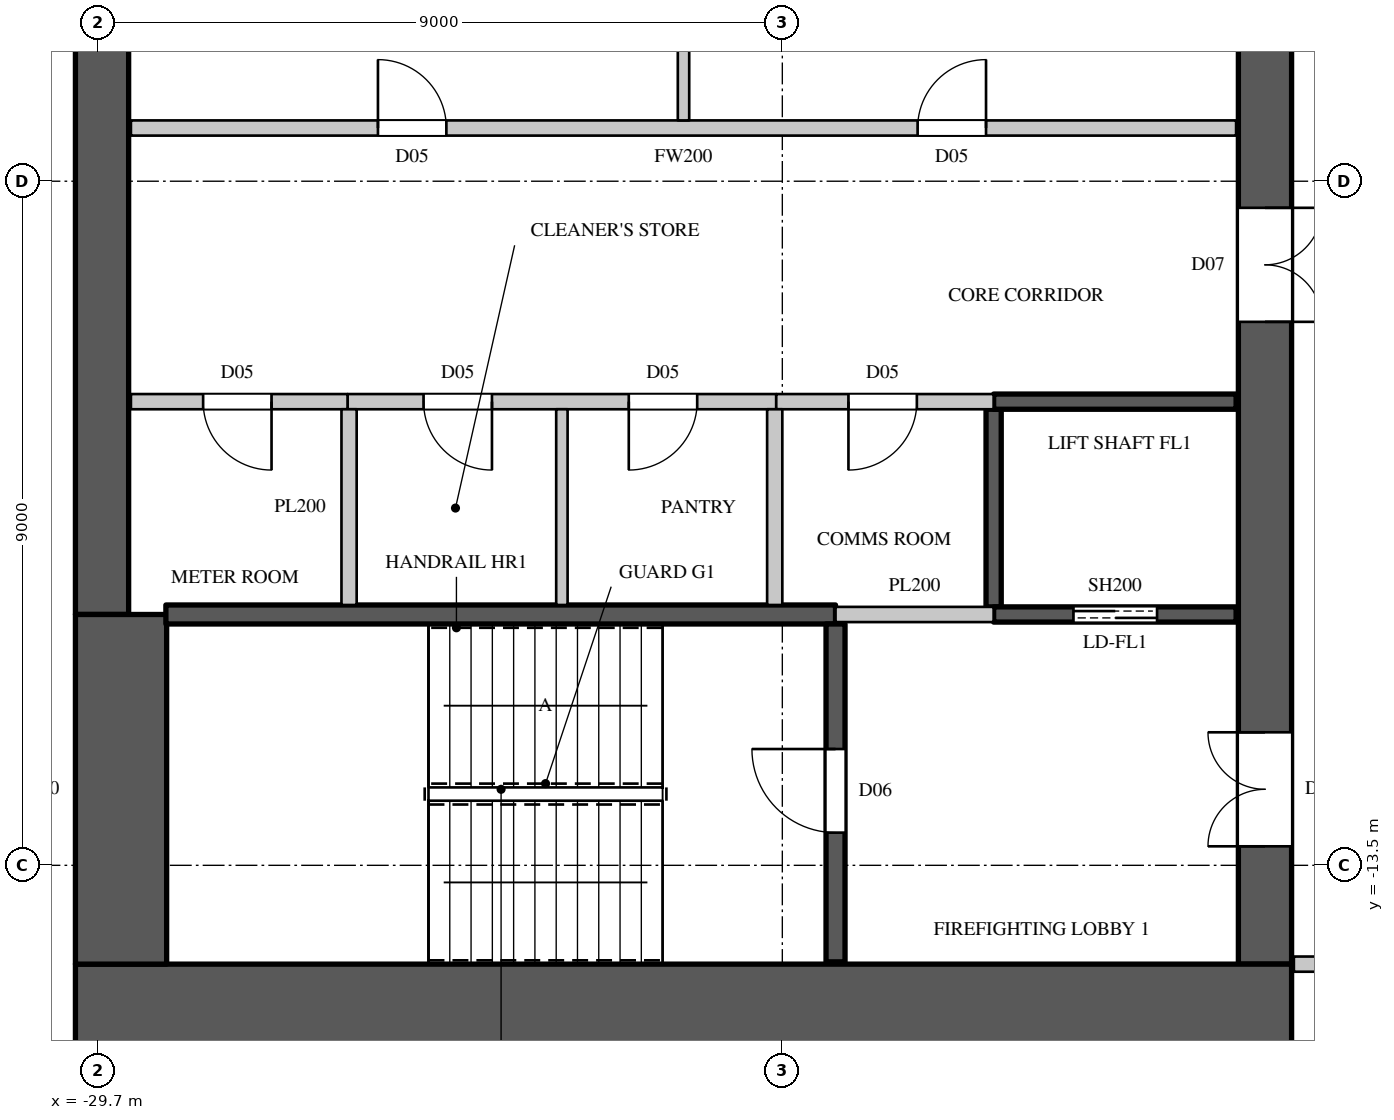
"""IFC4 building model, lengths in metres.
Left out: names, types, materials, properties, quantities, classifications, styles, units other than length and angle.
Written with IfcOpenShell. Run it as: python <this file> out.ifc"""

import sys

from ifc_helpers import new_model, si_unit, direction, frame, frame_2d, origin, place, context, subcontext, project, spatial, rectangle, extrude, element, fill, save


model = new_model("IFC4")
c1 = context("Model", 3, precision=1e-05, world=origin(), true_north=direction((0.0, 1.0)))
c2 = subcontext(c1, "Body", "Model", "MODEL_VIEW")
j1 = project(units=[si_unit("LENGTHUNIT", "METRE"), si_unit("PLANEANGLEUNIT", "RADIAN")], contexts=[c1])
p1 = place(None, origin())
s1 = spatial("IfcSite", under=j1, at=p1, CompositionType="ELEMENT")
p2 = place(p1, origin())
s2 = spatial("IfcBuilding", under=s1, at=p2, CompositionType="ELEMENT")
p3 = place(p2, frame((0.0, 0.0, 296.7)))
s3 = spatial("IfcBuildingStorey", under=s2, at=p3, CompositionType="ELEMENT", Elevation=296.7)
p4 = place(p3, frame((-30.0, -15.4, 0.0), z_axis=(0.0, 0.0, 1.0), x_axis=(1.0, 0.0, 0.0)))
e1 = element("IfcWall", 1, at=p4, inside=s3, PredefinedType="SHEAR", context=c2, shape_type="SweptSolid", body=[
    extrude(rectangle(XDim=16.0, YDim=1.2, at=frame_2d((8.0, 0.0))), origin(), (0.0, 0.0, 1.0), 4.1),
])
p5 = place(p3, frame((-14.35, -14.8, 0.0), z_axis=(0.0, 0.0, 1.0), x_axis=(0.0, 1.0, 0.0)))
e2 = element("IfcWall", 2, at=p5, inside=s3, PredefinedType="SHEAR", context=c2, shape_type="SweptSolid", body=[
    extrude(rectangle(XDim=29.6, YDim=0.7, at=frame_2d((14.8, 0.0))), origin(), (0.0, 0.0, 1.0), 4.1),
])
p6 = place(p5, frame((1.55, 0.0, 0.0)))
e3 = element("IfcOpeningElement", 3, at=p6, cuts=e2, PredefinedType="OPENING", context=c2, shape_type="SweptSolid", body=[
    extrude(rectangle(XDim=1.5, YDim=2.4, at=frame_2d((0.75, 1.2))), frame((0.0, 0.36, 0.0), z_axis=(0.0, -1.0, 0.0), x_axis=(1.0, 0.0, 0.0)), (0.0, 0.0, 1.0), 0.72),
])
p7 = place(p5, frame((26.55, 0.0, 0.0)))
e4 = element("IfcOpeningElement", 4, at=p7, cuts=e2, PredefinedType="OPENING", context=c2, shape_type="SweptSolid", body=[
    extrude(rectangle(XDim=1.5, YDim=2.4, at=frame_2d((0.75, 1.2))), frame((0.0, 0.36, 0.0), z_axis=(0.0, -1.0, 0.0), x_axis=(1.0, 0.0, 0.0)), (0.0, 0.0, 1.0), 0.72),
])
p8 = place(p5, frame((8.45, 0.0, 0.0)))
e5 = element("IfcOpeningElement", 5, at=p8, cuts=e2, PredefinedType="OPENING", context=c2, shape_type="SweptSolid", body=[
    extrude(rectangle(XDim=1.5, YDim=2.4, at=frame_2d((0.75, 1.2))), frame((0.0, 0.36, 0.0), z_axis=(0.0, -1.0, 0.0), x_axis=(1.0, 0.0, 0.0)), (0.0, 0.0, 1.0), 0.72),
])
p9 = place(p5, frame((19.65, 0.0, 0.0)))
e6 = element("IfcOpeningElement", 6, at=p9, cuts=e2, PredefinedType="OPENING", context=c2, shape_type="SweptSolid", body=[
    extrude(rectangle(XDim=1.5, YDim=2.4, at=frame_2d((0.75, 1.2))), frame((0.0, 0.36, 0.0), z_axis=(0.0, -1.0, 0.0), x_axis=(1.0, 0.0, 0.0)), (0.0, 0.0, 1.0), 0.72),
])
p10 = place(p5, frame((14.5, 0.0, 0.0)))
e7 = element("IfcOpeningElement", 7, at=p10, cuts=e2, PredefinedType="OPENING", context=c2, shape_type="SweptSolid", body=[
    extrude(rectangle(XDim=0.6, YDim=2.0, at=frame_2d((0.3, 1.0))), frame((0.0, 0.36, 0.0), z_axis=(0.0, -1.0, 0.0), x_axis=(1.0, 0.0, 0.0)), (0.0, 0.0, 1.0), 0.72),
])
p11 = place(p3, frame((-29.65, -10.2, 0.0), z_axis=(0.0, 0.0, 1.0), x_axis=(0.0, 1.0, 0.0)))
e8 = element("IfcWall", 8, at=p11, inside=s3, PredefinedType="SHEAR", context=c2, shape_type="SweptSolid", body=[
    extrude(rectangle(XDim=20.4, YDim=0.7, at=frame_2d((10.2, 0.0))), origin(), (0.0, 0.0, 1.0), 4.1),
])
p12 = place(p3, frame((-29.4, -14.8, 0.0), z_axis=(0.0, 0.0, 1.0), x_axis=(0.0, 1.0, 0.0)))
e9 = element("IfcWall", 9, at=p12, inside=s3, PredefinedType="SHEAR", context=c2, shape_type="SweptSolid", body=[
    extrude(rectangle(XDim=4.6, YDim=1.2, at=frame_2d((2.3, 0.0))), origin(), (0.0, 0.0, 1.0), 4.1),
])
p13 = place(p3, frame((-29.27, -3.8, 0.0), z_axis=(0.0, 0.0, 1.0), x_axis=(1.0, 0.0, 0.0)))
e10 = element("IfcWall", 10, at=p13, inside=s3, PredefinedType="PARTITIONING", context=c2, shape_type="SweptSolid", body=[
    extrude(rectangle(XDim=14.54, YDim=0.2, at=frame_2d((7.27, 0.0))), origin(), (0.0, 0.0, 1.0), 3.8),
])
p14 = place(p13, frame((3.25, 0.0, 0.0)))
e11 = element("IfcOpeningElement", 11, at=p14, cuts=e10, PredefinedType="OPENING", context=c2, shape_type="SweptSolid", body=[
    extrude(rectangle(XDim=0.9, YDim=2.2, at=frame_2d((0.45, 1.1))), frame((0.0, 0.11, 0.0), z_axis=(0.0, -1.0, 0.0), x_axis=(1.0, 0.0, 0.0)), (0.0, 0.0, 1.0), 0.22),
])
p15 = place(p13, frame((10.35, 0.0, 0.0)))
e12 = element("IfcOpeningElement", 12, at=p15, cuts=e10, PredefinedType="OPENING", context=c2, shape_type="SweptSolid", body=[
    extrude(rectangle(XDim=0.9, YDim=2.2, at=frame_2d((0.45, 1.1))), frame((0.0, 0.11, 0.0), z_axis=(0.0, -1.0, 0.0), x_axis=(1.0, 0.0, 0.0)), (0.0, 0.0, 1.0), 0.22),
])
p16 = place(p3, frame((-26.42, -7.4, 0.0), z_axis=(0.0, 0.0, 1.0), x_axis=(1.0, 0.0, 0.0)))
e13 = element("IfcWall", 13, at=p16, inside=s3, PredefinedType="PARTITIONING", context=c2, shape_type="SweptSolid", body=[
    extrude(rectangle(XDim=5.64, YDim=0.2, at=frame_2d((2.82, 0.0))), origin(), (0.0, 0.0, 1.0), 3.8),
])
p17 = place(p16, frame((1.0, 0.0, 0.0)))
e14 = element("IfcOpeningElement", 14, at=p17, cuts=e13, PredefinedType="OPENING", context=c2, shape_type="SweptSolid", body=[
    extrude(rectangle(XDim=0.9, YDim=2.2, at=frame_2d((0.45, 1.1))), frame((0.0, 0.11, 0.0), z_axis=(0.0, -1.0, 0.0), x_axis=(1.0, 0.0, 0.0)), (0.0, 0.0, 1.0), 0.22),
])
p18 = place(p16, frame((3.7, 0.0, 0.0)))
e15 = element("IfcOpeningElement", 15, at=p18, cuts=e13, PredefinedType="OPENING", context=c2, shape_type="SweptSolid", body=[
    extrude(rectangle(XDim=0.9, YDim=2.2, at=frame_2d((0.45, 1.1))), frame((0.0, 0.11, 0.0), z_axis=(0.0, -1.0, 0.0), x_axis=(1.0, 0.0, 0.0)), (0.0, 0.0, 1.0), 0.22),
])
p19 = place(p3, frame((-13.97, -14.8, 0.0), z_axis=(0.0, 0.0, 1.0), x_axis=(1.0, 0.0, 0.0)))
e16 = element("IfcWall", 16, at=p19, inside=s3, PredefinedType="PARTITIONING", context=c2, shape_type="SweptSolid", body=[
    extrude(rectangle(XDim=2.87, YDim=0.2, at=frame_2d((1.435, 0.0))), origin(), (0.0, 0.0, 1.0), 3.8),
])
p20 = place(p3, frame((-23.6, -10.075, 0.0), z_axis=(0.0, 0.0, 1.0), x_axis=(0.0, 1.0, 0.0)))
e17 = element("IfcWall", 17, at=p20, inside=s3, PredefinedType="PARTITIONING", context=c2, shape_type="SweptSolid", body=[
    extrude(rectangle(XDim=2.575, YDim=0.15, at=frame_2d((1.288, 0.0))), origin(), (0.0, 0.0, 1.0), 3.8),
])
p21 = place(p3, frame((-22.0, -3.7, 0.0), z_axis=(0.0, 0.0, 1.0), x_axis=(0.0, 1.0, 0.0)))
e18 = element("IfcWall", 18, at=p21, inside=s3, PredefinedType="PARTITIONING", context=c2, shape_type="SweptSolid", body=[
    extrude(rectangle(XDim=2.6, YDim=0.15, at=frame_2d((1.3, 0.0))), origin(), (0.0, 0.0, 1.0), 3.8),
])
p22 = place(p3, frame((-29.27, -7.4, 0.0), z_axis=(0.0, 0.0, 1.0), x_axis=(1.0, 0.0, 0.0)))
e19 = element("IfcWall", 19, at=p22, inside=s3, PredefinedType="PARTITIONING", context=c2, shape_type="SweptSolid", body=[
    extrude(rectangle(XDim=2.85, YDim=0.2, at=frame_2d((1.425, 0.0))), origin(), (0.0, 0.0, 1.0), 3.8),
])
p23 = place(p22, frame((0.95, 0.0, 0.0)))
e20 = element("IfcOpeningElement", 20, at=p23, cuts=e19, PredefinedType="OPENING", context=c2, shape_type="SweptSolid", body=[
    extrude(rectangle(XDim=0.9, YDim=2.2, at=frame_2d((0.45, 1.1))), frame((0.0, 0.11, 0.0), z_axis=(0.0, -1.0, 0.0), x_axis=(1.0, 0.0, 0.0)), (0.0, 0.0, 1.0), 0.22),
])
p24 = place(p3, frame((-26.4, -10.075, 0.0), z_axis=(0.0, 0.0, 1.0), x_axis=(0.0, 1.0, 0.0)))
e21 = element("IfcWall", 21, at=p24, inside=s3, PredefinedType="PARTITIONING", context=c2, shape_type="SweptSolid", body=[
    extrude(rectangle(XDim=2.575, YDim=0.2, at=frame_2d((1.288, 0.0))), origin(), (0.0, 0.0, 1.0), 3.8),
])
p25 = place(p3, frame((-20.78, -7.4, 0.0), z_axis=(0.0, 0.0, 1.0), x_axis=(1.0, 0.0, 0.0)))
e22 = element("IfcWall", 22, at=p25, inside=s3, PredefinedType="PARTITIONING", context=c2, shape_type="SweptSolid", body=[
    extrude(rectangle(XDim=2.86, YDim=0.2, at=frame_2d((1.43, 0.0))), origin(), (0.0, 0.0, 1.0), 3.8),
])
p26 = place(p25, frame((0.95, 0.0, 0.0)))
e23 = element("IfcOpeningElement", 23, at=p26, cuts=e22, PredefinedType="OPENING", context=c2, shape_type="SweptSolid", body=[
    extrude(rectangle(XDim=0.9, YDim=2.2, at=frame_2d((0.45, 1.1))), frame((0.0, 0.11, 0.0), z_axis=(0.0, -1.0, 0.0), x_axis=(1.0, 0.0, 0.0)), (0.0, 0.0, 1.0), 0.22),
])
p27 = place(p3, frame((-20.8, -10.075, 0.0), z_axis=(0.0, 0.0, 1.0), x_axis=(0.0, 1.0, 0.0)))
e24 = element("IfcWall", 24, at=p27, inside=s3, PredefinedType="PARTITIONING", context=c2, shape_type="SweptSolid", body=[
    extrude(rectangle(XDim=2.575, YDim=0.2, at=frame_2d((1.288, 0.0))), origin(), (0.0, 0.0, 1.0), 3.8),
])
p28 = place(p3, frame((-20.0, -10.2, 0.0), z_axis=(0.0, 0.0, 1.0), x_axis=(1.0, 0.0, 0.0)))
e25 = element("IfcWall", 25, at=p28, inside=s3, PredefinedType="PARTITIONING", context=c2, shape_type="SweptSolid", body=[
    extrude(rectangle(XDim=2.08, YDim=0.2, at=frame_2d((1.04, 0.0))), origin(), (0.0, 0.0, 1.0), 3.8),
])
p29 = place(p3, frame((-17.92, -10.1, 0.0), z_axis=(0.0, 0.0, 1.0), x_axis=(0.0, 1.0, 0.0)))
e26 = element("IfcWall", 26, at=p29, inside=s3, PredefinedType="SHEAR", context=c2, shape_type="SweptSolid", body=[
    extrude(rectangle(XDim=2.6, YDim=0.2, at=frame_2d((1.3, 0.0))), origin(), (0.0, 0.0, 1.0), 3.8),
])
p30 = place(p3, frame((-17.92, -10.2, 0.0), z_axis=(0.0, 0.0, 1.0), x_axis=(1.0, 0.0, 0.0)))
e27 = element("IfcWall", 27, at=p30, inside=s3, PredefinedType="SHEAR", context=c2, shape_type="SweptSolid", body=[
    extrude(rectangle(XDim=3.19, YDim=0.2, at=frame_2d((1.595, 0.0))), origin(), (0.0, 0.0, 1.0), 3.8),
])
p31 = place(p30, frame((1.05, 0.0, 0.0)))
e28 = element("IfcOpeningElement", 28, at=p31, cuts=e27, PredefinedType="OPENING", context=c2, shape_type="SweptSolid", body=[
    extrude(rectangle(XDim=1.1, YDim=2.2, at=frame_2d((0.55, 1.1))), frame((0.0, 0.11, 0.0), z_axis=(0.0, -1.0, 0.0), x_axis=(1.0, 0.0, 0.0)), (0.0, 0.0, 1.0), 0.22),
])
p32 = place(p3, frame((-17.92, -7.4, 0.0), z_axis=(0.0, 0.0, 1.0), x_axis=(1.0, 0.0, 0.0)))
e29 = element("IfcWall", 29, at=p32, inside=s3, PredefinedType="SHEAR", context=c2, shape_type="SweptSolid", body=[
    extrude(rectangle(XDim=3.19, YDim=0.2, at=frame_2d((1.595, 0.0))), origin(), (0.0, 0.0, 1.0), 3.8),
])
p33 = place(p3, frame((-28.81, -10.2, 0.0), z_axis=(0.0, 0.0, 1.0), x_axis=(1.0, 0.0, 0.0)))
e30 = element("IfcWall", 30, at=p33, inside=s3, PredefinedType="SHEAR", context=c2, shape_type="SweptSolid", body=[
    extrude(rectangle(XDim=8.81, YDim=0.25, at=frame_2d((4.405, 0.0))), origin(), (0.0, 0.0, 1.0), 3.8),
])
p34 = place(p3, frame((-20.0, -14.77, 0.0), z_axis=(0.0, 0.0, 1.0), x_axis=(0.0, 1.0, 0.0)))
e31 = element("IfcWall", 31, at=p34, inside=s3, PredefinedType="SHEAR", context=c2, shape_type="SweptSolid", body=[
    extrude(rectangle(XDim=4.445, YDim=0.25, at=frame_2d((2.223, 0.0))), origin(), (0.0, 0.0, 1.0), 3.8),
])
p35 = place(p34, frame((1.7, 0.0, 0.0)))
e32 = element("IfcOpeningElement", 32, at=p35, cuts=e31, PredefinedType="OPENING", context=c2, shape_type="SweptSolid", body=[
    extrude(rectangle(XDim=1.1, YDim=2.2, at=frame_2d((0.55, 1.1))), frame((0.0, 0.135, 0.0), z_axis=(0.0, -1.0, 0.0), x_axis=(1.0, 0.0, 0.0)), (0.0, 0.0, 1.0), 0.27),
])
p36 = place(p35, origin())
e33 = element("IfcDoor", 33, at=p36, inside=s3, OperationType="SINGLE_SWING_RIGHT", PredefinedType="DOOR", context=c2, shape_type="SweptSolid", body=[
    extrude(rectangle(XDim=1.1, YDim=2.2, at=frame_2d((0.55, 1.1))), frame((0.0, 0.025, 0.0), z_axis=(0.0, -1.0, 0.0), x_axis=(1.0, 0.0, 0.0)), (0.0, 0.0, 1.0), 0.05),
])
fill(e32, e33)
p37 = place(p23, origin())
e34 = element("IfcDoor", 34, at=p37, inside=s3, OperationType="SINGLE_SWING_LEFT", PredefinedType="DOOR", context=c2, shape_type="SweptSolid", body=[
    extrude(rectangle(XDim=0.9, YDim=2.2, at=frame_2d((0.45, 1.1))), frame((0.0, 0.025, 0.0), z_axis=(0.0, -1.0, 0.0), x_axis=(1.0, 0.0, 0.0)), (0.0, 0.0, 1.0), 0.05),
])
fill(e20, e34)
p38 = place(p17, origin())
e35 = element("IfcDoor", 35, at=p38, inside=s3, OperationType="SINGLE_SWING_LEFT", PredefinedType="DOOR", context=c2, shape_type="SweptSolid", body=[
    extrude(rectangle(XDim=0.9, YDim=2.2, at=frame_2d((0.45, 1.1))), frame((0.0, 0.025, 0.0), z_axis=(0.0, -1.0, 0.0), x_axis=(1.0, 0.0, 0.0)), (0.0, 0.0, 1.0), 0.05),
])
fill(e14, e35)
p39 = place(p18, origin())
e36 = element("IfcDoor", 36, at=p39, inside=s3, OperationType="SINGLE_SWING_RIGHT", PredefinedType="DOOR", context=c2, shape_type="SweptSolid", body=[
    extrude(rectangle(XDim=0.9, YDim=2.2, at=frame_2d((0.45, 1.1))), frame((0.0, 0.025, 0.0), z_axis=(0.0, -1.0, 0.0), x_axis=(1.0, 0.0, 0.0)), (0.0, 0.0, 1.0), 0.05),
])
fill(e15, e36)
p40 = place(p26, origin())
e37 = element("IfcDoor", 37, at=p40, inside=s3, OperationType="SINGLE_SWING_RIGHT", PredefinedType="DOOR", context=c2, shape_type="SweptSolid", body=[
    extrude(rectangle(XDim=0.9, YDim=2.2, at=frame_2d((0.45, 1.1))), frame((0.0, 0.025, 0.0), z_axis=(0.0, -1.0, 0.0), x_axis=(1.0, 0.0, 0.0)), (0.0, 0.0, 1.0), 0.05),
])
fill(e23, e37)
p41 = place(p14, origin())
e38 = element("IfcDoor", 38, at=p41, inside=s3, OperationType="SINGLE_SWING_LEFT", PredefinedType="DOOR", context=c2, shape_type="SweptSolid", body=[
    extrude(rectangle(XDim=0.9, YDim=2.2, at=frame_2d((0.45, 1.1))), frame((0.0, 0.025, 0.0), z_axis=(0.0, -1.0, 0.0), x_axis=(1.0, 0.0, 0.0)), (0.0, 0.0, 1.0), 0.05),
])
fill(e11, e38)
p42 = place(p15, origin())
e39 = element("IfcDoor", 39, at=p42, inside=s3, OperationType="SINGLE_SWING_RIGHT", PredefinedType="DOOR", context=c2, shape_type="SweptSolid", body=[
    extrude(rectangle(XDim=0.9, YDim=2.2, at=frame_2d((0.45, 1.1))), frame((0.0, 0.025, 0.0), z_axis=(0.0, -1.0, 0.0), x_axis=(1.0, 0.0, 0.0)), (0.0, 0.0, 1.0), 0.05),
])
fill(e12, e39)
p43 = place(p31, origin())
e40 = element("IfcDoor", 40, at=p43, inside=s3, OperationType="DOUBLE_DOOR_SLIDING", PredefinedType="DOOR", context=c2, shape_type="SweptSolid", body=[
    extrude(rectangle(XDim=1.1, YDim=2.2, at=frame_2d((0.55, 1.1))), frame((0.0, 0.025, 0.0), z_axis=(0.0, -1.0, 0.0), x_axis=(1.0, 0.0, 0.0)), (0.0, 0.0, 1.0), 0.05),
])
fill(e28, e40)
p44 = place(p6, origin())
e41 = element("IfcDoor", 41, at=p44, inside=s3, OperationType="DOUBLE_DOOR_SINGLE_SWING", PredefinedType="DOOR", context=c2, shape_type="SweptSolid", body=[
    extrude(rectangle(XDim=1.5, YDim=2.4, at=frame_2d((0.75, 1.2))), frame((0.0, 0.345, 0.0), z_axis=(0.0, -1.0, 0.0), x_axis=(1.0, 0.0, 0.0)), (0.0, 0.0, 1.0), 0.05),
])
fill(e3, e41)
p45 = place(p8, origin())
e42 = element("IfcDoor", 42, at=p45, inside=s3, OperationType="DOUBLE_DOOR_SINGLE_SWING", PredefinedType="DOOR", context=c2, shape_type="SweptSolid", body=[
    extrude(rectangle(XDim=1.5, YDim=2.4, at=frame_2d((0.75, 1.2))), frame((0.0, -0.295, 0.0), z_axis=(0.0, -1.0, 0.0), x_axis=(1.0, 0.0, 0.0)), (0.0, 0.0, 1.0), 0.05),
])
fill(e5, e42)
save(model, sys.argv[1])
